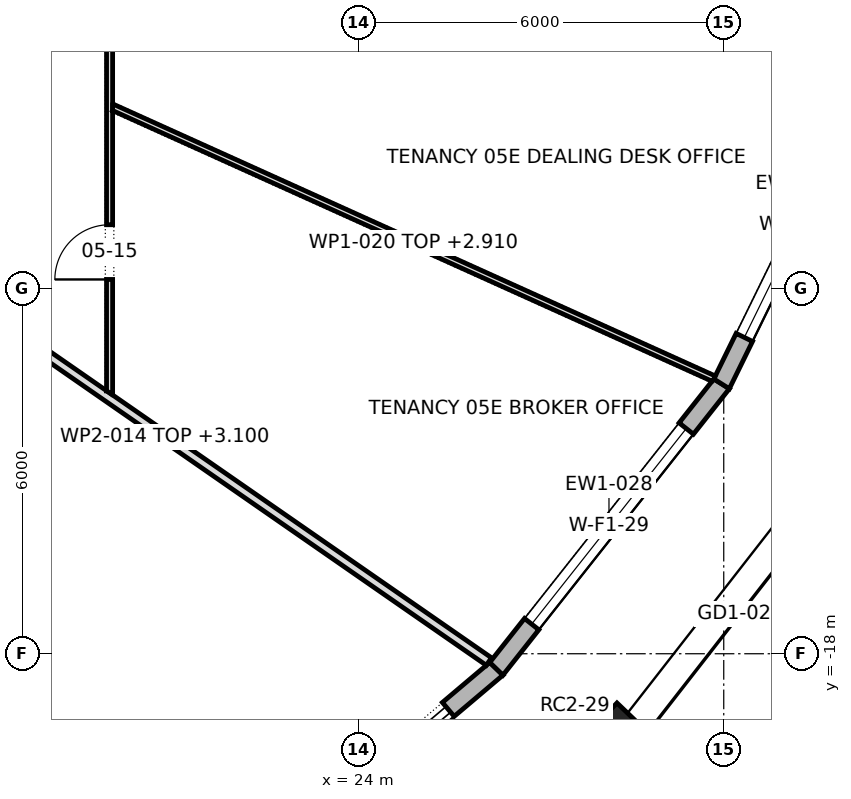
"""IFC4 building model, lengths in metres.
Left out: names, types, materials, properties, quantities, classifications, styles, units other than length and angle.
Written with IfcOpenShell. Run it as: python <this file> out.ifc"""

import sys

from ifc_helpers import new_model, si_unit, direction, frame, frame_2d, origin, origin_2d, place, context, subcontext, project, spatial, polyline, rectangle, outline, extrude, element, fill, save


model = new_model("IFC4")
c1 = context("Model", 3, precision=1e-05, world=origin(), true_north=direction((0.0, 1.0)))
c2 = subcontext(c1, "Body", "Model", "MODEL_VIEW")
j1 = project(units=[si_unit("LENGTHUNIT", "METRE"), si_unit("PLANEANGLEUNIT", "RADIAN")], contexts=[c1])
p1 = place(None, origin())
s1 = spatial("IfcSite", under=j1, at=p1, CompositionType="ELEMENT")
p2 = place(p1, origin())
s2 = spatial("IfcBuilding", under=s1, at=p2, CompositionType="ELEMENT")
p3 = place(p2, frame((0.0, 0.0, 82.3)))
s3 = spatial("IfcBuildingStorey", under=s2, at=p3, CompositionType="ELEMENT", Elevation=82.3)
p4 = place(p3, frame((28.052, -19.733, 0.0), z_axis=(0.0, 0.0, 1.0), x_axis=(0.691576091297, 0.722303613411, 0.0)))
e1 = element("IfcColumn", 1, at=p4, inside=s3, PredefinedType="COLUMN", context=c2, shape_type="SweptSolid", body=[
    extrude(rectangle(XDim=1.6, YDim=1.0, at=origin_2d()), origin(), (0.0, 0.0, 1.0), 4.2),
])
p5 = place(p3, frame((21.549, -22.231, 0.0), z_axis=(0.0, 0.0, 1.0), x_axis=(0.763693886759, 0.645578536916, 0.0)))
e2 = element("IfcWall", 2, at=p5, inside=s3, PredefinedType="STANDARD", context=c2, shape_type="SweptSolid", body=[
    extrude(outline(polyline([(-0.014, -0.15), (6.185, -0.15), (6.155, 0.15), (0.014, 0.15), (-0.014, -0.15)])), origin(), (0.0, 0.0, 1.0), 3.9),
])
p6 = place(p5, frame((1.035, 0.0, 0.0)))
e3 = element("IfcOpeningElement", 3, at=p6, cuts=e2, PredefinedType="OPENING", context=c2, shape_type="SweptSolid", body=[
    extrude(rectangle(XDim=4.1, YDim=3.45, at=frame_2d((2.05, 1.725))), frame((0.0, 0.162, 0.0), z_axis=(0.0, -1.0, 0.0), x_axis=(1.0, 0.0, 0.0)), (0.0, 0.0, 1.0), 0.324),
])
p7 = place(p3, frame((26.26, -18.248, 0.0), z_axis=(0.0, 0.0, 1.0), x_axis=(0.620093447965, 0.784527957303, 0.0)))
e4 = element("IfcWall", 4, at=p7, inside=s3, PredefinedType="STANDARD", context=c2, shape_type="SweptSolid", body=[
    extrude(outline(polyline([(-0.015, -0.15), (5.989, -0.15), (5.957, 0.15), (0.015, 0.15), (-0.015, -0.15)])), origin(), (0.0, 0.0, 1.0), 3.9),
])
p8 = place(p7, frame((0.937, 0.0, 0.6)))
e5 = element("IfcOpeningElement", 5, at=p8, cuts=e4, PredefinedType="OPENING", context=c2, shape_type="SweptSolid", body=[
    extrude(rectangle(XDim=4.1, YDim=2.85, at=frame_2d((2.05, 1.425))), frame((0.0, 0.162, 0.0), z_axis=(0.0, -1.0, 0.0), x_axis=(1.0, 0.0, 0.0)), (0.0, 0.0, 1.0), 0.324),
])
p9 = place(p3, frame((29.964, -13.562, 0.0), z_axis=(0.0, 0.0, 1.0), x_axis=(0.440027465772, 0.897984314655, 0.0)))
e6 = element("IfcWall", 6, at=p9, inside=s3, PredefinedType="STANDARD", context=c2, shape_type="SweptSolid", body=[
    extrude(outline(polyline([(-0.016, -0.15), (5.818, -0.15), (5.784, 0.15), (0.016, 0.15), (-0.016, -0.15)])), origin(), (0.0, 0.0, 1.0), 3.9),
])
p10 = place(p9, frame((0.85, 0.0, 0.6)))
e7 = element("IfcOpeningElement", 7, at=p10, cuts=e6, PredefinedType="OPENING", context=c2, shape_type="SweptSolid", body=[
    extrude(rectangle(XDim=4.1, YDim=2.85, at=frame_2d((2.05, 1.425))), frame((0.0, 0.162, 0.0), z_axis=(0.0, -1.0, 0.0), x_axis=(1.0, 0.0, 0.0)), (0.0, 0.0, 1.0), 0.324),
])
p11 = place(p3, frame((15.418, -10.692, 0.0), z_axis=(0.0, 0.0, 1.0), x_axis=(0.821683258501, -0.569944403166, 0.0)))
e8 = element("IfcWall", 8, at=p11, inside=s3, PredefinedType="PARTITIONING", context=c2, shape_type="SweptSolid", body=[
    extrude(outline(polyline([(13.047, 0.075), (11.122, 0.075), (9.196, 0.075), (7.271, 0.075), (5.346, 0.075), (5.343, 0.073), (5.342, 0.075), (3.562, 0.075), (1.781, 0.075), (0.0, 0.075), (0.0, 0.074), (0.028, 0.034), (0.04, 0.043), (0.122, -0.075), (1.968, -0.075), (3.815, -0.075), (5.661, -0.075), (7.508, -0.075), (9.354, -0.075), (11.2, -0.075), (13.047, -0.075), (13.047, 0.075)])), origin(), (0.0, 0.0, 1.0), 3.1),
])
p12 = place(p3, frame((19.9, -13.744, 0.0), z_axis=(0.0, 0.0, 1.0), x_axis=(0.0, 1.0, 0.0)))
e9 = element("IfcWall", 9, at=p12, inside=s3, PredefinedType="PARTITIONING", context=c2, shape_type="SweptSolid", body=[
    extrude(outline(polyline([(0.0, -0.05), (1.559, -0.05), (3.118, -0.05), (4.677, -0.05), (4.678, -0.048), (4.683, -0.05), (6.631, -0.05), (8.58, -0.05), (8.58, -0.048), (8.588, -0.05), (10.286, -0.05), (11.985, -0.05), (13.683, -0.05), (15.382, -0.05), (17.081, -0.05), (18.779, -0.05), (18.779, -0.048), (18.754, 0.05), (16.984, 0.05), (15.214, 0.05), (13.444, 0.05), (11.674, 0.05), (9.904, 0.05), (9.904, 0.05), (9.804, 0.05), (9.804, 0.05), (7.857, 0.05), (5.91, 0.05), (3.963, 0.05), (2.016, 0.05), (0.069, 0.05), (0.0, -0.05), (0.0, -0.05)])), origin(), (0.0, 0.0, 1.0), 3.9),
])
p13 = place(p12, frame((12.179, 0.0, 0.0)))
e10 = element("IfcOpeningElement", 10, at=p13, cuts=e9, PredefinedType="OPENING", context=c2, shape_type="SweptSolid", body=[
    extrude(rectangle(XDim=0.9, YDim=2.1, at=frame_2d((0.45, 1.05))), frame((0.0, 0.062, 0.0), z_axis=(0.0, -1.0, 0.0), x_axis=(1.0, 0.0, 0.0)), (0.0, 0.0, 1.0), 0.124),
])
p14 = place(p12, frame((1.899, 0.0, 0.0)))
e11 = element("IfcOpeningElement", 11, at=p14, cuts=e9, PredefinedType="OPENING", context=c2, shape_type="SweptSolid", body=[
    extrude(rectangle(XDim=0.9, YDim=2.1, at=frame_2d((0.45, 1.05))), frame((0.0, 0.062, 0.0), z_axis=(0.0, -1.0, 0.0), x_axis=(1.0, 0.0, 0.0)), (0.0, 0.0, 1.0), 0.124),
])
p15 = place(p3, frame((19.93, -9.003, 0.0), z_axis=(0.0, 0.0, 1.0), x_axis=(0.911407001064, -0.41150610981, 0.0)))
e12 = element("IfcWall", 12, at=p15, inside=s3, PredefinedType="PARTITIONING", context=c2, shape_type="SweptSolid", body=[
    extrude(outline(polyline([(0.045, -0.05), (1.847, -0.05), (3.65, -0.05), (5.453, -0.05), (7.255, -0.05), (9.058, -0.05), (10.861, -0.05), (10.872, -0.004), (10.874, 0.05), (9.062, 0.05), (7.249, 0.05), (5.437, 0.05), (3.625, 0.05), (1.812, 0.05), (0.0, 0.05), (0.0, 0.049), (0.045, -0.05)])), origin(), (0.0, 0.0, 1.0), 2.91),
])
p16 = place(p3, frame((19.938, -5.11, 0.0), z_axis=(0.0, 0.0, 1.0), x_axis=(0.96855855203, -0.248785713594, 0.0)))
e13 = element("IfcWall", 13, at=p16, inside=s3, PredefinedType="PARTITIONING", context=c2, shape_type="SweptSolid", body=[
    extrude(outline(polyline([(0.025, -0.05), (1.855, -0.05), (3.684, -0.05), (5.513, -0.05), (7.342, -0.05), (9.171, -0.05), (11.0, -0.05), (12.829, -0.05), (12.839, -0.005), (12.839, 0.05), (11.005, 0.05), (9.17, 0.05), (7.336, 0.05), (5.502, 0.05), (3.668, 0.05), (1.834, 0.05), (0.0, 0.05), (0.0, 0.049), (0.025, -0.05)])), origin(), (0.0, 0.0, 1.0), 2.91),
])
p17 = place(p16, frame((6.103, 0.0, 0.0)))
e14 = element("IfcOpeningElement", 14, at=p17, cuts=e13, PredefinedType="OPENING", context=c2, shape_type="SweptSolid", body=[
    extrude(rectangle(XDim=0.9, YDim=2.1, at=frame_2d((0.45, 1.05))), frame((0.0, 0.062, 0.0), z_axis=(0.0, -1.0, 0.0), x_axis=(1.0, 0.0, 0.0)), (0.0, 0.0, 1.0), 0.124),
])
p18 = place(p6, origin())
e15 = element("IfcDoor", 15, at=p18, inside=s3, OperationType="DOUBLE_DOOR_SLIDING", PredefinedType="DOOR", context=c2, shape_type="SweptSolid", body=[
    extrude(rectangle(XDim=4.1, YDim=3.45, at=frame_2d((2.05, 1.725))), frame((0.0, 0.025, 0.0), z_axis=(0.0, -1.0, 0.0), x_axis=(1.0, 0.0, 0.0)), (0.0, 0.0, 1.0), 0.05),
])
fill(e3, e15)
p19 = place(p8, origin())
e16 = element("IfcWindow", 16, at=p19, inside=s3, PartitioningType="TRIPLE_PANEL_VERTICAL", PredefinedType="WINDOW", context=c2, shape_type="SweptSolid", body=[
    extrude(rectangle(XDim=4.1, YDim=2.85, at=frame_2d((2.05, 1.425))), frame((0.0, 0.03, 0.0), z_axis=(0.0, -1.0, 0.0), x_axis=(1.0, 0.0, 0.0)), (0.0, 0.0, 1.0), 0.06),
])
fill(e5, e16)
p20 = place(p10, origin())
e17 = element("IfcWindow", 17, at=p20, inside=s3, PartitioningType="TRIPLE_PANEL_VERTICAL", PredefinedType="WINDOW", context=c2, shape_type="SweptSolid", body=[
    extrude(rectangle(XDim=4.1, YDim=2.85, at=frame_2d((2.05, 1.425))), frame((0.0, 0.03, 0.0), z_axis=(0.0, -1.0, 0.0), x_axis=(1.0, 0.0, 0.0)), (0.0, 0.0, 1.0), 0.06),
])
fill(e7, e17)
p21 = place(p14, origin())
e18 = element("IfcDoor", 18, at=p21, inside=s3, OperationType="SINGLE_SWING_RIGHT", PredefinedType="DOOR", context=c2, shape_type="SweptSolid", body=[
    extrude(rectangle(XDim=0.9, YDim=2.1, at=frame_2d((0.45, 1.05))), frame((0.0, 0.025, 0.0), z_axis=(0.0, -1.0, 0.0), x_axis=(1.0, 0.0, 0.0)), (0.0, 0.0, 1.0), 0.05),
])
fill(e11, e18)
save(model, sys.argv[1])
